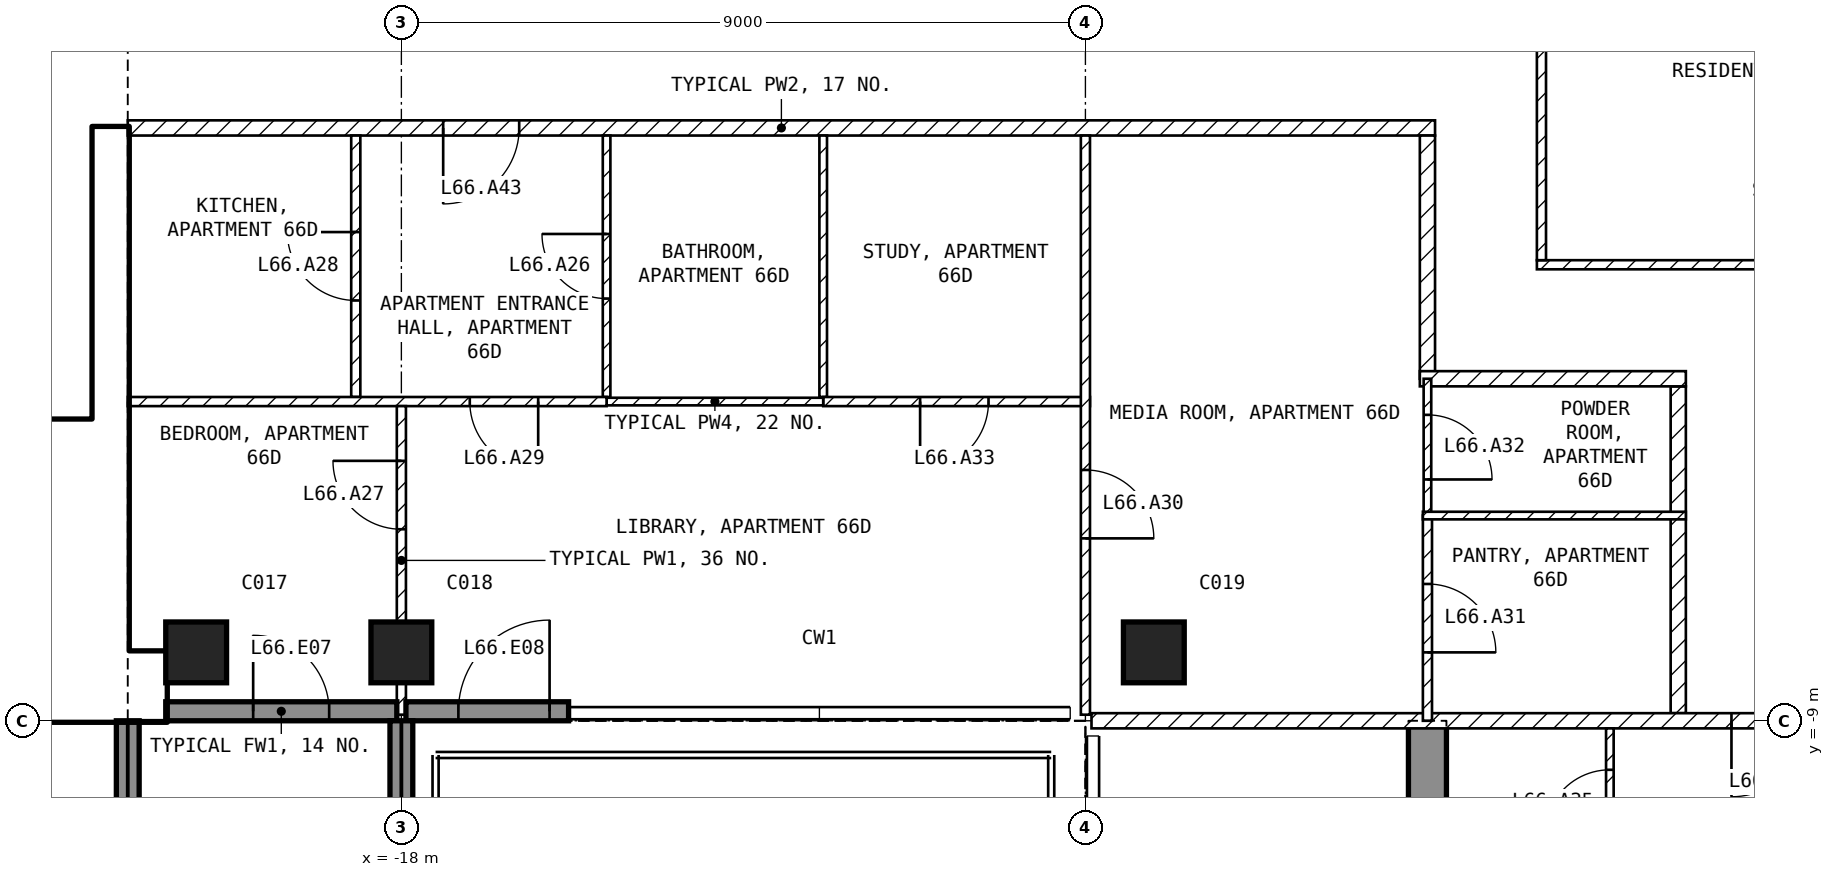
"""IFC4 building model, lengths in metres.
Left out: names, types, materials, properties, quantities, classifications, styles, units other than length and angle.
Written with IfcOpenShell. Run it as: python <this file> out.ifc"""

import sys

from ifc_helpers import new_model, si_unit, direction, frame, frame_2d, origin, origin_2d, place, context, subcontext, project, spatial, polyline, rectangle, outline, extrude, element, fill, save


model = new_model("IFC4")
c1 = context("Model", 3, precision=1e-05, world=origin(), true_north=direction((0.0, 1.0)))
c2 = subcontext(c1, "Body", "Model", "MODEL_VIEW")
j1 = project(units=[si_unit("LENGTHUNIT", "METRE"), si_unit("PLANEANGLEUNIT", "RADIAN")], contexts=[c1])
p1 = place(None, origin())
s1 = spatial("IfcSite", under=j1, at=p1, CompositionType="ELEMENT")
p2 = place(p1, origin())
s2 = spatial("IfcBuilding", under=s1, at=p2, CompositionType="ELEMENT")
p3 = place(p2, frame((0.0, 0.0, 260.5)))
s3 = spatial("IfcBuildingStorey", under=s2, at=p3, CompositionType="ELEMENT", Elevation=260.5)
for number, where, z_axis, x_axis in (
    (1, (-20.7, -8.1, -0.25), (0.0, 0.0, 1.0), (1.0, 0.0, 0.0)),
    (2, (-18.0, -8.1, -0.25), (0.0, 0.0, 1.0), (1.0, 0.0, 0.0)),
    (3, (-8.1, -8.1, -0.25), (0.0, 0.0, 1.0), (1.0, 0.0, 0.0)),
):
    element("IfcColumn", number, at=place(p3, frame(where, z_axis=z_axis, x_axis=x_axis)), inside=s3, PredefinedType="COLUMN", context=c2, shape_type="SweptSolid", body=[
        extrude(rectangle(XDim=0.8, YDim=0.8, at=origin_2d()), origin(), (0.0, 0.0, 1.0), 3.5),
    ])
p4 = place(p3, frame((-4.75, -16.7, -0.25), z_axis=(1.0, 0.0, 0.0), x_axis=(0.0, 1.0, 0.0)))
e4 = element("IfcWall", 4, at=p4, inside=s3, PredefinedType="SHEAR", context=c2, shape_type="SweptSolid", body=[
    extrude(outline(polyline([(0.0, 0.0), (3.2, 0.0), (3.2, 2.65), (5.6, 2.65), (5.6, 0.0), (7.7, 0.0), (7.7, 3.5), (0.0, 3.5), (0.0, 0.0)])), origin(), (0.0, 0.0, 1.0), 0.5),
])
p5 = place(p3, frame((-21.1, -8.875, 0.0), z_axis=(0.0, 0.0, 1.0), x_axis=(1.0, 0.0, 0.0)))
e5 = element("IfcWall", 5, at=p5, inside=s3, PredefinedType="SOLIDWALL", context=c2, shape_type="SweptSolid", body=[
    extrude(rectangle(XDim=3.04, YDim=0.25, at=frame_2d((1.52, 0.0))), origin(), (0.0, 0.0, 1.0), 3.25),
])
p6 = place(p5, frame((1.15, 0.0, 0.0)))
e6 = element("IfcOpeningElement", 6, at=p6, cuts=e5, PredefinedType="OPENING", context=c2, shape_type="SweptSolid", body=[
    extrude(rectangle(XDim=1.0, YDim=2.4, at=frame_2d((0.5, 1.2))), frame((0.0, 0.135, 0.0), z_axis=(0.0, -1.0, 0.0), x_axis=(1.0, 0.0, 0.0)), (0.0, 0.0, 1.0), 0.27),
])
p7 = place(p3, frame((-17.94, -8.875, 0.0), z_axis=(0.0, 0.0, 1.0), x_axis=(1.0, 0.0, 0.0)))
e7 = element("IfcWall", 7, at=p7, inside=s3, PredefinedType="SOLIDWALL", context=c2, shape_type="SweptSolid", body=[
    extrude(rectangle(XDim=2.14, YDim=0.25, at=frame_2d((1.07, 0.0))), origin(), (0.0, 0.0, 1.0), 3.25),
])
p8 = place(p7, frame((0.69, 0.0, 0.0)))
e8 = element("IfcOpeningElement", 8, at=p8, cuts=e7, PredefinedType="OPENING", context=c2, shape_type="SweptSolid", body=[
    extrude(rectangle(XDim=1.2, YDim=2.4, at=frame_2d((0.6, 1.2))), frame((0.0, 0.135, 0.0), z_axis=(0.0, -1.0, 0.0), x_axis=(1.0, 0.0, 0.0)), (0.0, 0.0, 1.0), 0.27),
])
p9 = place(p3, frame((-21.6, -9.0, 0.0), z_axis=(0.0, 0.0, 1.0), x_axis=(0.0, -1.0, 0.0)))
e9 = element("IfcWall", 9, at=p9, inside=s3, PredefinedType="SOLIDWALL", context=c2, shape_type="SweptSolid", body=[
    extrude(rectangle(XDim=2.7, YDim=0.3, at=frame_2d((1.35, 0.0))), origin(), (0.0, 0.0, 1.0), 3.25),
])
p10 = place(p3, frame((-18.0, -9.0, 0.0), z_axis=(0.0, 0.0, 1.0), x_axis=(0.0, -1.0, 0.0)))
e10 = element("IfcWall", 10, at=p10, inside=s3, PredefinedType="SOLIDWALL", context=c2, shape_type="SweptSolid", body=[
    extrude(rectangle(XDim=2.74, YDim=0.3, at=frame_2d((1.37, 0.0))), origin(), (0.0, 0.0, 1.0), 3.25),
])
p11 = place(p3, frame((-30.2, -8.55, 0.0), z_axis=(0.0, 0.0, 1.0), x_axis=(1.0, 0.0, 0.0)))
e11 = element("IfcWall", 11, at=p11, inside=s3, PredefinedType="SHEAR", context=c2, shape_type="SweptSolid", body=[
    extrude(rectangle(XDim=9.1, YDim=0.9, at=frame_2d((4.55, 0.0))), origin(), (0.0, 0.0, 1.0), 3.25),
])
p12 = place(p3, frame((-21.825, -8.1, 0.0), z_axis=(0.0, 0.0, 1.0), x_axis=(0.0, 1.0, 0.0)))
e12 = element("IfcWall", 12, at=p12, inside=s3, PredefinedType="SHEAR", context=c2, shape_type="SweptSolid", body=[
    extrude(rectangle(XDim=6.9, YDim=0.45, at=frame_2d((3.45, 0.0))), origin(), (0.0, 0.0, 1.0), 3.25),
])
p13 = place(p3, frame((-28.35, -5.15, 0.0), z_axis=(0.0, 0.0, 1.0), x_axis=(1.0, 0.0, 0.0)))
e13 = element("IfcWall", 13, at=p13, inside=s3, PredefinedType="SOLIDWALL", context=c2, shape_type="SweptSolid", body=[
    extrude(rectangle(XDim=6.3, YDim=0.2, at=frame_2d((3.15, 0.0))), origin(), (0.0, 0.0, 1.0), 3.25),
])
p14 = place(p13, frame((5.1, 0.0, 0.0)))
e14 = element("IfcOpeningElement", 14, at=p14, cuts=e13, PredefinedType="OPENING", context=c2, shape_type="SweptSolid", body=[
    extrude(rectangle(XDim=1.0, YDim=2.1, at=frame_2d((0.5, 1.05))), frame((0.0, 0.11, 0.0), z_axis=(0.0, -1.0, 0.0), x_axis=(1.0, 0.0, 0.0)), (0.0, 0.0, 1.0), 0.22),
])
p15 = place(p3, frame((-3.06, -3.0, 0.0), z_axis=(0.0, 0.0, 1.0), x_axis=(1.0, 0.0, 0.0)))
e15 = element("IfcWall", 15, at=p15, inside=s3, PredefinedType="PARTITIONING", context=c2, shape_type="SweptSolid", body=[
    extrude(rectangle(XDim=6.12, YDim=0.12, at=frame_2d((3.06, 0.0))), origin(), (0.0, 0.0, 1.0), 3.25),
])
p16 = place(p3, frame((-3.0, 2.94, 0.0), z_axis=(0.0, 0.0, 1.0), x_axis=(0.0, -1.0, 0.0)))
e16 = element("IfcWall", 16, at=p16, inside=s3, PredefinedType="PARTITIONING", context=c2, shape_type="SweptSolid", body=[
    extrude(rectangle(XDim=5.88, YDim=0.12, at=frame_2d((2.94, 0.0))), origin(), (0.0, 0.0, 1.0), 3.25),
])
p17 = place(p3, frame((-4.4, -1.2, 0.0), z_axis=(0.0, 0.0, 1.0), x_axis=(-1.0, 0.0, 0.0)))
e17 = element("IfcWall", 17, at=p17, inside=s3, PredefinedType="PARTITIONING", context=c2, shape_type="SweptSolid", body=[
    extrude(rectangle(XDim=17.2, YDim=0.2, at=frame_2d((8.6, 0.0))), origin(), (0.0, 0.0, 1.0), 3.25),
])
p18 = place(p17, frame((12.05, 0.0, 0.0)))
e18 = element("IfcOpeningElement", 18, at=p18, cuts=e17, PredefinedType="OPENING", context=c2, shape_type="SweptSolid", body=[
    extrude(rectangle(XDim=1.0, YDim=2.1, at=frame_2d((0.5, 1.05))), frame((0.0, 0.11, 0.0), z_axis=(0.0, -1.0, 0.0), x_axis=(1.0, 0.0, 0.0)), (0.0, 0.0, 1.0), 0.22),
])
p19 = place(p3, frame((-4.5, -4.5, 0.0), z_axis=(0.0, 0.0, 1.0), x_axis=(0.0, 1.0, 0.0)))
e19 = element("IfcWall", 19, at=p19, inside=s3, PredefinedType="PARTITIONING", context=c2, shape_type="SweptSolid", body=[
    extrude(rectangle(XDim=3.2, YDim=0.2, at=frame_2d((1.6, 0.0))), origin(), (0.0, 0.0, 1.0), 3.25),
])
p20 = place(p3, frame((-1.2, -8.9, 0.0), z_axis=(0.0, 0.0, 1.0), x_axis=(0.0, 1.0, 0.0)))
e20 = element("IfcWall", 20, at=p20, inside=s3, PredefinedType="PARTITIONING", context=c2, shape_type="SweptSolid", body=[
    extrude(rectangle(XDim=4.3, YDim=0.2, at=frame_2d((2.15, 0.0))), origin(), (0.0, 0.0, 1.0), 3.25),
])
p21 = place(p3, frame((-1.1, -4.5, 0.0), z_axis=(0.0, 0.0, 1.0), x_axis=(-1.0, 0.0, 0.0)))
e21 = element("IfcWall", 21, at=p21, inside=s3, PredefinedType="PARTITIONING", context=c2, shape_type="SweptSolid", body=[
    extrude(rectangle(XDim=3.5, YDim=0.2, at=frame_2d((1.75, 0.0))), origin(), (0.0, 0.0, 1.0), 3.25),
])
p22 = place(p3, frame((8.92, -9.0, 0.0), z_axis=(0.0, 0.0, 1.0), x_axis=(-1.0, 0.0, 0.0)))
e22 = element("IfcWall", 22, at=p22, inside=s3, PredefinedType="PARTITIONING", context=c2, shape_type="SweptSolid", body=[
    extrude(rectangle(XDim=17.84, YDim=0.2, at=frame_2d((8.92, 0.0))), origin(), (0.0, 0.0, 1.0), 3.25),
])
p23 = place(p22, frame((8.42, 0.0, 0.0)))
e23 = element("IfcOpeningElement", 23, at=p23, cuts=e22, PredefinedType="OPENING", context=c2, shape_type="SweptSolid", body=[
    extrude(rectangle(XDim=1.0, YDim=2.1, at=frame_2d((0.5, 1.05))), frame((0.0, 0.11, 0.0), z_axis=(0.0, -1.0, 0.0), x_axis=(1.0, 0.0, 0.0)), (0.0, 0.0, 1.0), 0.22),
])
p24 = place(p3, frame((-12.45, -4.74, 0.0), z_axis=(0.0, 0.0, 1.0), x_axis=(0.0, 1.0, 0.0)))
e24 = element("IfcWall", 24, at=p24, inside=s3, PredefinedType="PARTITIONING", context=c2, shape_type="SweptSolid", body=[
    extrude(rectangle(XDim=3.44, YDim=0.1, at=frame_2d((1.72, 0.0))), origin(), (0.0, 0.0, 1.0), 3.25),
])
p25 = place(p3, frame((-8.94, -4.8, 0.0), z_axis=(0.0, 0.0, 1.0), x_axis=(-1.0, 0.0, 0.0)))
e25 = element("IfcWall", 25, at=p25, inside=s3, PredefinedType="PARTITIONING", context=c2, shape_type="SweptSolid", body=[
    extrude(rectangle(XDim=3.51, YDim=0.12, at=frame_2d((1.755, 0.0))), origin(), (0.0, 0.0, 1.0), 3.25),
])
p26 = place(p25, frame((1.335, 0.0, 0.0)))
e26 = element("IfcOpeningElement", 26, at=p26, cuts=e25, PredefinedType="OPENING", context=c2, shape_type="SweptSolid", body=[
    extrude(rectangle(XDim=0.9, YDim=2.1, at=frame_2d((0.45, 1.05))), frame((0.0, 0.07, 0.0), z_axis=(0.0, -1.0, 0.0), x_axis=(1.0, 0.0, 0.0)), (0.0, 0.0, 1.0), 0.14),
])
p27 = place(p3, frame((-9.0, -1.3, 0.0), z_axis=(0.0, 0.0, 1.0), x_axis=(0.0, -1.0, 0.0)))
e27 = element("IfcWall", 27, at=p27, inside=s3, PredefinedType="PARTITIONING", context=c2, shape_type="SweptSolid", body=[
    extrude(rectangle(XDim=7.62, YDim=0.12, at=frame_2d((3.81, 0.0))), origin(), (0.0, 0.0, 1.0), 3.25),
])
p28 = place(p27, frame((4.4, 0.0, 0.0)))
e28 = element("IfcOpeningElement", 28, at=p28, cuts=e27, PredefinedType="OPENING", context=c2, shape_type="SweptSolid", body=[
    extrude(rectangle(XDim=0.9, YDim=2.1, at=frame_2d((0.45, 1.05))), frame((0.0, 0.07, 0.0), z_axis=(0.0, -1.0, 0.0), x_axis=(1.0, 0.0, 0.0)), (0.0, 0.0, 1.0), 0.14),
])
p29 = place(p3, frame((-15.3, -4.74, 0.0), z_axis=(0.0, 0.0, 1.0), x_axis=(0.0, 1.0, 0.0)))
e29 = element("IfcWall", 29, at=p29, inside=s3, PredefinedType="PARTITIONING", context=c2, shape_type="SweptSolid", body=[
    extrude(rectangle(XDim=3.44, YDim=0.1, at=frame_2d((1.72, 0.0))), origin(), (0.0, 0.0, 1.0), 3.25),
])
p30 = place(p29, frame((1.295, 0.0, 0.0)))
e30 = element("IfcOpeningElement", 30, at=p30, cuts=e29, PredefinedType="OPENING", context=c2, shape_type="SweptSolid", body=[
    extrude(rectangle(XDim=0.85, YDim=2.1, at=frame_2d((0.425, 1.05))), frame((0.0, 0.06, 0.0), z_axis=(0.0, -1.0, 0.0), x_axis=(1.0, 0.0, 0.0)), (0.0, 0.0, 1.0), 0.12),
])
p31 = place(p3, frame((-12.45, -4.8, 0.0), z_axis=(0.0, 0.0, 1.0), x_axis=(-1.0, 0.0, 0.0)))
e31 = element("IfcWall", 31, at=p31, inside=s3, PredefinedType="PARTITIONING", context=c2, shape_type="SweptSolid", body=[
    extrude(rectangle(XDim=2.85, YDim=0.1, at=frame_2d((1.425, 0.0))), origin(), (0.0, 0.0, 1.0), 3.25),
])
p32 = place(p3, frame((-18.6, -4.74, 0.0), z_axis=(0.0, 0.0, 1.0), x_axis=(0.0, 1.0, 0.0)))
e32 = element("IfcWall", 32, at=p32, inside=s3, PredefinedType="PARTITIONING", context=c2, shape_type="SweptSolid", body=[
    extrude(rectangle(XDim=3.44, YDim=0.12, at=frame_2d((1.72, 0.0))), origin(), (0.0, 0.0, 1.0), 3.25),
])
p33 = place(p32, frame((1.27, 0.0, 0.0)))
e33 = element("IfcOpeningElement", 33, at=p33, cuts=e32, PredefinedType="OPENING", context=c2, shape_type="SweptSolid", body=[
    extrude(rectangle(XDim=0.9, YDim=2.1, at=frame_2d((0.45, 1.05))), frame((0.0, 0.07, 0.0), z_axis=(0.0, -1.0, 0.0), x_axis=(1.0, 0.0, 0.0)), (0.0, 0.0, 1.0), 0.14),
])
p34 = place(p3, frame((-15.3, -4.8, 0.0), z_axis=(0.0, 0.0, 1.0), x_axis=(-1.0, 0.0, 0.0)))
e34 = element("IfcWall", 34, at=p34, inside=s3, PredefinedType="PARTITIONING", context=c2, shape_type="SweptSolid", body=[
    extrude(rectangle(XDim=6.3, YDim=0.12, at=frame_2d((3.15, 0.0))), origin(), (0.0, 0.0, 1.0), 3.25),
])
p35 = place(p34, frame((0.9, 0.0, 0.0)))
e35 = element("IfcOpeningElement", 35, at=p35, cuts=e34, PredefinedType="OPENING", context=c2, shape_type="SweptSolid", body=[
    extrude(rectangle(XDim=0.9, YDim=2.1, at=frame_2d((0.45, 1.05))), frame((0.0, 0.07, 0.0), z_axis=(0.0, -1.0, 0.0), x_axis=(1.0, 0.0, 0.0)), (0.0, 0.0, 1.0), 0.14),
])
p36 = place(p3, frame((-18.0, -8.92, 0.0), z_axis=(0.0, 0.0, 1.0), x_axis=(0.0, 1.0, 0.0)))
e36 = element("IfcWall", 36, at=p36, inside=s3, PredefinedType="PARTITIONING", context=c2, shape_type="SweptSolid", body=[
    extrude(rectangle(XDim=4.06, YDim=0.12, at=frame_2d((2.03, 0.0))), origin(), (0.0, 0.0, 1.0), 2.496),
])
p37 = place(p36, frame((2.44, 0.0, 0.0)))
e37 = element("IfcOpeningElement", 37, at=p37, cuts=e36, PredefinedType="OPENING", context=c2, shape_type="SweptSolid", body=[
    extrude(rectangle(XDim=0.9, YDim=2.1, at=frame_2d((0.45, 1.05))), frame((0.0, 0.07, 0.0), z_axis=(0.0, -1.0, 0.0), x_axis=(1.0, 0.0, 0.0)), (0.0, 0.0, 1.0), 0.14),
])
p38 = place(p3, frame((-4.5, -4.5, 0.0), z_axis=(0.0, 0.0, 1.0), x_axis=(0.0, -1.0, 0.0)))
e38 = element("IfcWall", 38, at=p38, inside=s3, PredefinedType="PARTITIONING", context=c2, shape_type="SweptSolid", body=[
    extrude(rectangle(XDim=1.8, YDim=0.1, at=frame_2d((0.9, 0.0))), origin(), (0.0, 0.0, 1.0), 3.25),
])
p39 = place(p38, frame((0.475, 0.0, 0.0)))
e39 = element("IfcOpeningElement", 39, at=p39, cuts=e38, PredefinedType="OPENING", context=c2, shape_type="SweptSolid", body=[
    extrude(rectangle(XDim=0.85, YDim=2.1, at=frame_2d((0.425, 1.05))), frame((0.0, 0.06, 0.0), z_axis=(0.0, -1.0, 0.0), x_axis=(1.0, 0.0, 0.0)), (0.0, 0.0, 1.0), 0.12),
])
p40 = place(p3, frame((-4.5, -6.3, 0.0), z_axis=(0.0, 0.0, 1.0), x_axis=(0.0, -1.0, 0.0)))
e40 = element("IfcWall", 40, at=p40, inside=s3, PredefinedType="PARTITIONING", context=c2, shape_type="SweptSolid", body=[
    extrude(rectangle(XDim=2.7, YDim=0.12, at=frame_2d((1.35, 0.0))), origin(), (0.0, 0.0, 1.0), 3.25),
])
p41 = place(p40, frame((0.9, 0.0, 0.0)))
e41 = element("IfcOpeningElement", 41, at=p41, cuts=e40, PredefinedType="OPENING", context=c2, shape_type="SweptSolid", body=[
    extrude(rectangle(XDim=0.9, YDim=2.1, at=frame_2d((0.45, 1.05))), frame((0.0, 0.07, 0.0), z_axis=(0.0, -1.0, 0.0), x_axis=(1.0, 0.0, 0.0)), (0.0, 0.0, 1.0), 0.14),
])
p42 = place(p3, frame((-1.1, -6.3, 0.0), z_axis=(0.0, 0.0, 1.0), x_axis=(-1.0, 0.0, 0.0)))
e42 = element("IfcWall", 42, at=p42, inside=s3, PredefinedType="PARTITIONING", context=c2, shape_type="SweptSolid", body=[
    extrude(rectangle(XDim=3.46, YDim=0.1, at=frame_2d((1.73, 0.0))), origin(), (0.0, 0.0, 1.0), 3.25),
])
p43 = place(p3, frame((-2.1, -11.04, 0.0), z_axis=(0.0, 0.0, 1.0), x_axis=(0.0, 1.0, 0.0)))
e43 = element("IfcWall", 43, at=p43, inside=s3, PredefinedType="PARTITIONING", context=c2, shape_type="SweptSolid", body=[
    extrude(rectangle(XDim=1.94, YDim=0.1, at=frame_2d((0.97, 0.0))), origin(), (0.0, 0.0, 1.0), 3.25),
])
p44 = place(p43, frame((0.545, 0.0, 0.0)))
e44 = element("IfcOpeningElement", 44, at=p44, cuts=e43, PredefinedType="OPENING", context=c2, shape_type="SweptSolid", body=[
    extrude(rectangle(XDim=0.85, YDim=2.1, at=frame_2d((0.425, 1.05))), frame((0.0, 0.06, 0.0), z_axis=(0.0, -1.0, 0.0), x_axis=(1.0, 0.0, 0.0)), (0.0, 0.0, 1.0), 0.12),
])
p45 = place(p6, origin())
e45 = element("IfcDoor", 45, at=p45, inside=s3, OperationType="SINGLE_SWING_LEFT", PredefinedType="DOOR", context=c2, shape_type="SweptSolid", body=[
    extrude(rectangle(XDim=1.0, YDim=2.4, at=frame_2d((0.5, 1.2))), frame((0.0, 0.025, 0.0), z_axis=(0.0, -1.0, 0.0), x_axis=(1.0, 0.0, 0.0)), (0.0, 0.0, 1.0), 0.05),
])
fill(e6, e45)
p46 = place(p8, origin())
e46 = element("IfcDoor", 46, at=p46, inside=s3, OperationType="SINGLE_SWING_RIGHT", PredefinedType="DOOR", context=c2, shape_type="SweptSolid", body=[
    extrude(rectangle(XDim=1.2, YDim=2.4, at=frame_2d((0.6, 1.2))), frame((0.0, 0.025, 0.0), z_axis=(0.0, -1.0, 0.0), x_axis=(1.0, 0.0, 0.0)), (0.0, 0.0, 1.0), 0.05),
])
fill(e8, e46)
p47 = place(p14, origin())
e47 = element("IfcDoor", 47, at=p47, inside=s3, OperationType="SINGLE_SWING_LEFT", PredefinedType="DOOR", context=c2, shape_type="SweptSolid", body=[
    extrude(rectangle(XDim=1.0, YDim=2.1, at=frame_2d((0.5, 1.05))), frame((0.0, 0.025, 0.0), z_axis=(0.0, -1.0, 0.0), x_axis=(1.0, 0.0, 0.0)), (0.0, 0.0, 1.0), 0.05),
])
fill(e14, e47)
p48 = place(p30, origin())
e48 = element("IfcDoor", 48, at=p48, inside=s3, OperationType="SINGLE_SWING_RIGHT", PredefinedType="DOOR", context=c2, shape_type="SweptSolid", body=[
    extrude(rectangle(XDim=0.85, YDim=2.1, at=frame_2d((0.425, 1.05))), frame((0.0, 0.025, 0.0), z_axis=(0.0, -1.0, 0.0), x_axis=(1.0, 0.0, 0.0)), (0.0, 0.0, 1.0), 0.05),
])
fill(e30, e48)
p49 = place(p37, origin())
e49 = element("IfcDoor", 49, at=p49, inside=s3, OperationType="SINGLE_SWING_RIGHT", PredefinedType="DOOR", context=c2, shape_type="SweptSolid", body=[
    extrude(rectangle(XDim=0.9, YDim=2.1, at=frame_2d((0.45, 1.05))), frame((0.0, 0.025, 0.0), z_axis=(0.0, -1.0, 0.0), x_axis=(1.0, 0.0, 0.0)), (0.0, 0.0, 1.0), 0.05),
])
fill(e37, e49)
p50 = place(p33, origin())
e50 = element("IfcDoor", 50, at=p50, inside=s3, OperationType="SINGLE_SWING_RIGHT", PredefinedType="DOOR", context=c2, shape_type="SweptSolid", body=[
    extrude(rectangle(XDim=0.9, YDim=2.1, at=frame_2d((0.45, 1.05))), frame((0.0, 0.025, 0.0), z_axis=(0.0, -1.0, 0.0), x_axis=(1.0, 0.0, 0.0)), (0.0, 0.0, 1.0), 0.05),
])
fill(e33, e50)
p51 = place(p35, origin())
e51 = element("IfcDoor", 51, at=p51, inside=s3, OperationType="SINGLE_SWING_LEFT", PredefinedType="DOOR", context=c2, shape_type="SweptSolid", body=[
    extrude(rectangle(XDim=0.9, YDim=2.1, at=frame_2d((0.45, 1.05))), frame((0.0, 0.025, 0.0), z_axis=(0.0, -1.0, 0.0), x_axis=(1.0, 0.0, 0.0)), (0.0, 0.0, 1.0), 0.05),
])
fill(e35, e51)
p52 = place(p28, origin())
e52 = element("IfcDoor", 52, at=p52, inside=s3, OperationType="SINGLE_SWING_RIGHT", PredefinedType="DOOR", context=c2, shape_type="SweptSolid", body=[
    extrude(rectangle(XDim=0.9, YDim=2.1, at=frame_2d((0.45, 1.05))), frame((0.0, 0.025, 0.0), z_axis=(0.0, -1.0, 0.0), x_axis=(1.0, 0.0, 0.0)), (0.0, 0.0, 1.0), 0.05),
])
fill(e28, e52)
p53 = place(p41, origin())
e53 = element("IfcDoor", 53, at=p53, inside=s3, OperationType="SINGLE_SWING_RIGHT", PredefinedType="DOOR", context=c2, shape_type="SweptSolid", body=[
    extrude(rectangle(XDim=0.9, YDim=2.1, at=frame_2d((0.45, 1.05))), frame((0.0, 0.025, 0.0), z_axis=(0.0, -1.0, 0.0), x_axis=(1.0, 0.0, 0.0)), (0.0, 0.0, 1.0), 0.05),
])
fill(e41, e53)
p54 = place(p39, origin())
e54 = element("IfcDoor", 54, at=p54, inside=s3, OperationType="SINGLE_SWING_RIGHT", PredefinedType="DOOR", context=c2, shape_type="SweptSolid", body=[
    extrude(rectangle(XDim=0.85, YDim=2.1, at=frame_2d((0.425, 1.05))), frame((0.0, 0.025, 0.0), z_axis=(0.0, -1.0, 0.0), x_axis=(1.0, 0.0, 0.0)), (0.0, 0.0, 1.0), 0.05),
])
fill(e39, e54)
p55 = place(p26, origin())
e55 = element("IfcDoor", 55, at=p55, inside=s3, OperationType="SINGLE_SWING_RIGHT", PredefinedType="DOOR", context=c2, shape_type="SweptSolid", body=[
    extrude(rectangle(XDim=0.9, YDim=2.1, at=frame_2d((0.45, 1.05))), frame((0.0, 0.025, 0.0), z_axis=(0.0, -1.0, 0.0), x_axis=(1.0, 0.0, 0.0)), (0.0, 0.0, 1.0), 0.05),
])
fill(e26, e55)
p56 = place(p23, origin())
e56 = element("IfcDoor", 56, at=p56, inside=s3, OperationType="SINGLE_SWING_RIGHT", PredefinedType="DOOR", context=c2, shape_type="SweptSolid", body=[
    extrude(rectangle(XDim=1.0, YDim=2.1, at=frame_2d((0.5, 1.05))), frame((0.0, 0.025, 0.0), z_axis=(0.0, -1.0, 0.0), x_axis=(1.0, 0.0, 0.0)), (0.0, 0.0, 1.0), 0.05),
])
fill(e23, e56)
p57 = place(p44, origin())
e57 = element("IfcDoor", 57, at=p57, inside=s3, OperationType="SINGLE_SWING_LEFT", PredefinedType="DOOR", context=c2, shape_type="SweptSolid", body=[
    extrude(rectangle(XDim=0.85, YDim=2.1, at=frame_2d((0.425, 1.05))), frame((0.0, 0.025, 0.0), z_axis=(0.0, -1.0, 0.0), x_axis=(1.0, 0.0, 0.0)), (0.0, 0.0, 1.0), 0.05),
])
fill(e44, e57)
p58 = place(p18, origin())
e58 = element("IfcDoor", 58, at=p58, inside=s3, OperationType="SINGLE_SWING_RIGHT", PredefinedType="DOOR", context=c2, shape_type="SweptSolid", body=[
    extrude(rectangle(XDim=1.0, YDim=2.1, at=frame_2d((0.5, 1.05))), frame((0.0, 0.025, 0.0), z_axis=(0.0, -1.0, 0.0), x_axis=(1.0, 0.0, 0.0)), (0.0, 0.0, 1.0), 0.05),
])
fill(e18, e58)
save(model, sys.argv[1])
